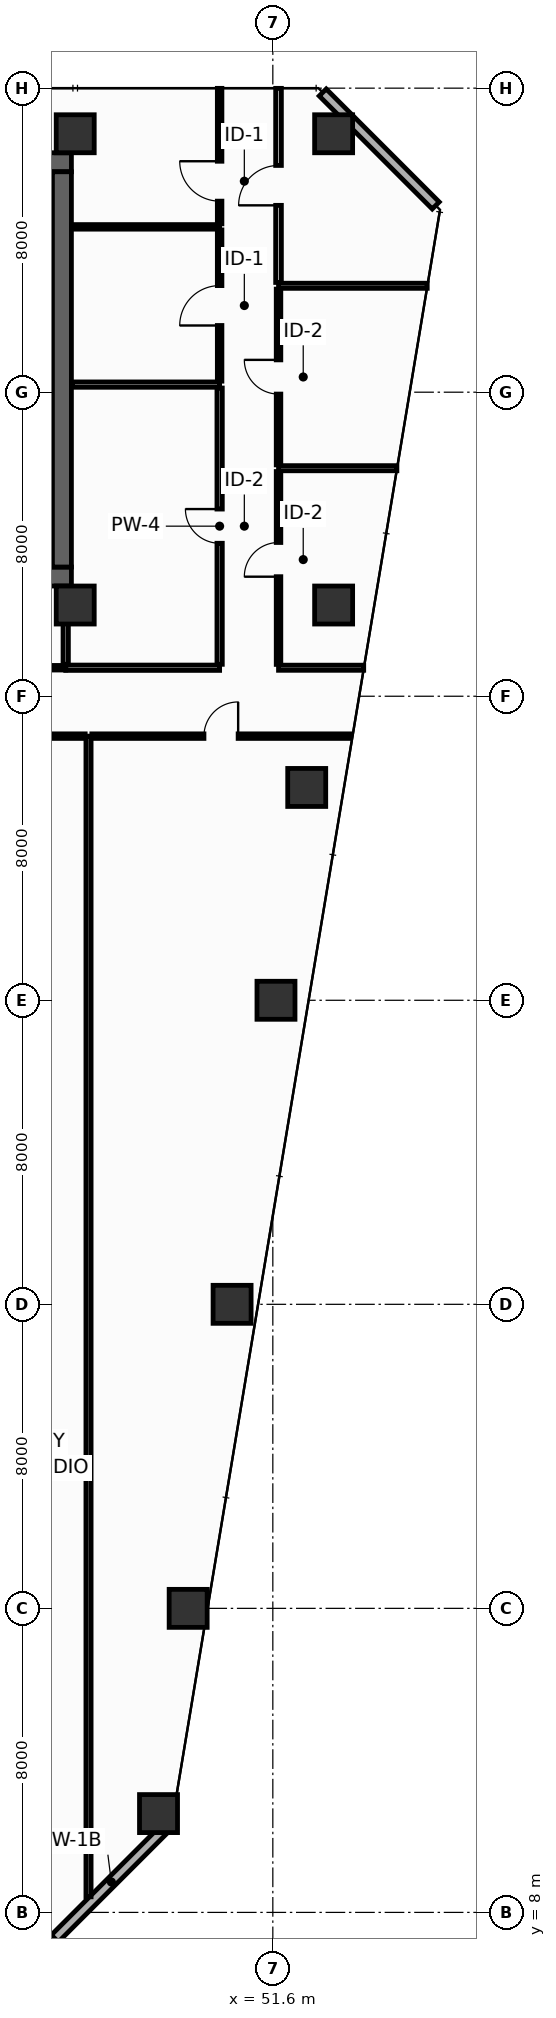
"""IFC4 building model, lengths in metres.
Left out: names, types, materials, properties, quantities, classifications, styles, units other than length and angle.
Written with IfcOpenShell. Run it as: python <this file> out.ifc"""

import sys

from ifc_helpers import new_model, si_unit, direction, frame, frame_2d, origin, origin_2d, place, context, subcontext, project, spatial, rectangle, hollow_rectangle, extrude, element, fill, save


model = new_model("IFC4")
c1 = context("Model", 3, precision=1e-05, world=origin(), true_north=direction((0.0, 1.0)))
c2 = subcontext(c1, "Body", "Model", "MODEL_VIEW")
j1 = project(units=[si_unit("LENGTHUNIT", "METRE"), si_unit("PLANEANGLEUNIT", "RADIAN")], contexts=[c1])
p1 = place(None, origin())
s1 = spatial("IfcSite", under=j1, at=p1, CompositionType="ELEMENT")
p2 = place(p1, origin())
s2 = spatial("IfcBuilding", under=s1, at=p2, CompositionType="ELEMENT")
p3 = place(p2, frame((0.0, 0.0, 129.6)))
s3 = spatial("IfcBuildingStorey", under=s2, at=p3, CompositionType="ELEMENT", Elevation=129.6)
p4 = place(p3, frame((13.6, 43.15, 0.0), z_axis=(0.0, 0.0, 1.0), x_axis=(1.0, 0.0, 0.0)))
e1 = element("IfcWall", 1, at=p4, inside=s3, PredefinedType="SHEAR", context=c2, shape_type="SweptSolid", body=[
    extrude(rectangle(XDim=32.7, YDim=0.5, at=frame_2d((16.35, 0.0))), origin(), (0.0, 0.0, 1.0), 3.55),
])
p5 = place(p4, frame((5.4, 0.0, 0.0)))
e2 = element("IfcOpeningElement", 2, at=p5, cuts=e1, PredefinedType="OPENING", context=c2, shape_type="SweptSolid", body=[
    extrude(rectangle(XDim=1.1, YDim=2.15, at=frame_2d((0.55, 1.075))), frame((0.0, 0.26, 0.0), z_axis=(0.0, -1.0, 0.0), x_axis=(1.0, 0.0, 0.0)), (0.0, 0.0, 1.0), 0.52),
])
p6 = place(p4, frame((25.6, 0.0, 0.0)))
e3 = element("IfcOpeningElement", 3, at=p6, cuts=e1, PredefinedType="OPENING", context=c2, shape_type="SweptSolid", body=[
    extrude(rectangle(XDim=1.1, YDim=2.15, at=frame_2d((0.55, 1.075))), frame((0.0, 0.26, 0.0), z_axis=(0.0, -1.0, 0.0), x_axis=(1.0, 0.0, 0.0)), (0.0, 0.0, 1.0), 0.52),
])
p7 = place(p3, frame((13.6, 54.05, 0.0), z_axis=(0.0, 0.0, 1.0), x_axis=(1.0, 0.0, 0.0)))
e4 = element("IfcWall", 4, at=p7, inside=s3, PredefinedType="SHEAR", context=c2, shape_type="SweptSolid", body=[
    extrude(rectangle(XDim=32.7, YDim=0.5, at=frame_2d((16.35, 0.0))), origin(), (0.0, 0.0, 1.0), 3.55),
])
p8 = place(p3, frame((46.05, 43.4, 0.0), z_axis=(0.0, 0.0, 1.0), x_axis=(0.0, 1.0, 0.0)))
e5 = element("IfcWall", 5, at=p8, inside=s3, PredefinedType="SHEAR", context=c2, shape_type="SweptSolid", body=[
    extrude(rectangle(XDim=10.4, YDim=0.5, at=frame_2d((5.2, 0.0))), origin(), (0.0, 0.0, 1.0), 3.55),
])
for number, where, z_axis, x_axis in (
    (6, (46.4, 54.8, 0.0), (0.0, 0.0, 1.0), (1.0, 0.0, 0.0)),
    (7, (53.2, 54.8, 0.0), (0.0, 0.0, 1.0), (1.0, 0.0, 0.0)),
    (8, (46.4, 42.4, 0.0), (0.0, 0.0, 1.0), (1.0, 0.0, 0.0)),
    (9, (53.2, 42.4, 0.0), (0.0, 0.0, 1.0), (1.0, 0.0, 0.0)),
    (10, (48.592, 10.6, 0.0), (0.0, 0.0, 1.0), (1.0, 0.0, 0.0)),
    (11, (49.372, 16.0, 0.0), (0.0, 0.0, 1.0), (1.0, 0.0, 0.0)),
    (12, (50.528, 24.0, 0.0), (0.0, 0.0, 1.0), (1.0, 0.0, 0.0)),
    (13, (51.683, 32.0, 0.0), (0.0, 0.0, 1.0), (1.0, 0.0, 0.0)),
    (14, (52.492, 37.6, 0.0), (0.0, 0.0, 1.0), (1.0, 0.0, 0.0)),
):
    element("IfcColumn", number, at=place(p3, frame(where, z_axis=z_axis, x_axis=x_axis)), inside=s3, PredefinedType="COLUMN", context=c2, shape_type="SweptSolid", body=[
        extrude(hollow_rectangle(XDim=1.0, YDim=1.0, WallThickness=0.045, at=origin_2d()), origin(), (0.0, 0.0, 1.0), 3.8),
    ])
p9 = place(p3, frame((45.864, 7.313, 0.0), z_axis=(0.0, 0.0, 1.0), x_axis=(0.70707775441, 0.707135806771, 0.0)))
e15 = element("IfcWall", 15, at=p9, inside=s3, PredefinedType="STANDARD", context=c2, shape_type="SweptSolid", body=[
    extrude(rectangle(XDim=4.206, YDim=0.26, at=frame_2d((2.103, 0.0))), origin(), (0.0, 0.0, 1.0), 3.55),
])
p10 = place(p3, frame((55.887, 52.913, 0.0), z_axis=(0.0, 0.0, 1.0), x_axis=(-0.707106781187, 0.707106781187, 0.0)))
e16 = element("IfcWall", 16, at=p10, inside=s3, PredefinedType="STANDARD", context=c2, shape_type="SweptSolid", body=[
    extrude(rectangle(XDim=4.206, YDim=0.26, at=frame_2d((2.103, 0.0))), origin(), (0.0, 0.0, 1.0), 3.55),
])
p11 = place(p3, frame((46.15, 40.75, 0.0), z_axis=(0.0, 0.0, 1.0), x_axis=(1.0, 0.0, 0.0)))
e17 = element("IfcWall", 17, at=p11, inside=s3, PredefinedType="PARTITIONING", context=c2, shape_type="SweptSolid", body=[
    extrude(rectangle(XDim=4.05, YDim=0.14, at=frame_2d((2.025, 0.0))), origin(), (0.0, 0.0, 1.0), 3.55),
])
p12 = place(p3, frame((46.15, 40.84, 0.0), z_axis=(0.0, 0.0, 1.0), x_axis=(0.0, 1.0, 0.0)))
e18 = element("IfcWall", 18, at=p12, inside=s3, PredefinedType="PARTITIONING", context=c2, shape_type="SweptSolid", body=[
    extrude(rectangle(XDim=2.04, YDim=0.14, at=frame_2d((1.02, 0.0))), origin(), (0.0, 0.0, 1.0), 3.55),
])
p13 = place(p3, frame((46.32, 48.2, 0.0), z_axis=(0.0, 0.0, 1.0), x_axis=(1.0, 0.0, 0.0)))
e19 = element("IfcWall", 19, at=p13, inside=s3, PredefinedType="PARTITIONING", context=c2, shape_type="SweptSolid", body=[
    extrude(rectangle(XDim=3.88, YDim=0.14, at=frame_2d((1.94, 0.0))), origin(), (0.0, 0.0, 1.0), 3.55),
])
p14 = place(p3, frame((50.2, 40.84, 0.0), z_axis=(0.0, 0.0, 1.0), x_axis=(0.0, 1.0, 0.0)))
e20 = element("IfcWall", 20, at=p14, inside=s3, PredefinedType="PARTITIONING", context=c2, shape_type="SweptSolid", body=[
    extrude(rectangle(XDim=7.27, YDim=0.14, at=frame_2d((3.635, 0.0))), origin(), (0.0, 0.0, 1.0), 2.835),
])
p15 = place(p14, frame((3.185, 0.0, 0.0)))
e21 = element("IfcOpeningElement", 21, at=p15, cuts=e20, PredefinedType="OPENING", context=c2, shape_type="SweptSolid", body=[
    extrude(rectangle(XDim=0.9, YDim=2.1, at=frame_2d((0.45, 1.05))), frame((0.0, 0.08, 0.0), z_axis=(0.0, -1.0, 0.0), x_axis=(1.0, 0.0, 0.0)), (0.0, 0.0, 1.0), 0.16),
])
p16 = place(p3, frame((46.32, 52.35, 0.0), z_axis=(0.0, 0.0, 1.0), x_axis=(1.0, 0.0, 0.0)))
e22 = element("IfcWall", 22, at=p16, inside=s3, PredefinedType="PARTITIONING", context=c2, shape_type="SweptSolid", body=[
    extrude(rectangle(XDim=3.88, YDim=0.12, at=frame_2d((1.94, 0.0))), origin(), (0.0, 0.0, 1.0), 3.55),
])
p17 = place(p3, frame((50.2, 48.29, 0.0), z_axis=(0.0, 0.0, 1.0), x_axis=(0.0, 1.0, 0.0)))
e23 = element("IfcWall", 23, at=p17, inside=s3, PredefinedType="PARTITIONING", context=c2, shape_type="SweptSolid", body=[
    extrude(rectangle(XDim=3.98, YDim=0.12, at=frame_2d((1.99, 0.0))), origin(), (0.0, 0.0, 1.0), 3.55),
])
p18 = place(p17, frame((1.465, 0.0, 0.0)))
e24 = element("IfcOpeningElement", 24, at=p18, cuts=e23, PredefinedType="OPENING", context=c2, shape_type="SweptSolid", body=[
    extrude(rectangle(XDim=1.05, YDim=2.15, at=frame_2d((0.525, 1.075))), frame((0.0, 0.07, 0.0), z_axis=(0.0, -1.0, 0.0), x_axis=(1.0, 0.0, 0.0)), (0.0, 0.0, 1.0), 0.14),
])
p19 = place(p3, frame((50.2, 52.43, 0.0), z_axis=(0.0, 0.0, 1.0), x_axis=(0.0, 1.0, 0.0)))
e25 = element("IfcWall", 25, at=p19, inside=s3, PredefinedType="PARTITIONING", context=c2, shape_type="SweptSolid", body=[
    extrude(rectangle(XDim=3.565, YDim=0.12, at=frame_2d((1.783, 0.0))), origin(), (0.0, 0.0, 1.0), 2.935),
])
p20 = place(p19, frame((0.597, 0.0, 0.0)))
e26 = element("IfcOpeningElement", 26, at=p20, cuts=e25, PredefinedType="OPENING", context=c2, shape_type="SweptSolid", body=[
    extrude(rectangle(XDim=1.05, YDim=2.15, at=frame_2d((0.525, 1.075))), frame((0.0, 0.07, 0.0), z_axis=(0.0, -1.0, 0.0), x_axis=(1.0, 0.0, 0.0)), (0.0, 0.0, 1.0), 0.14),
])
p21 = place(p3, frame((51.75, 40.75, 0.0), z_axis=(0.0, 0.0, 1.0), x_axis=(1.0, 0.0, 0.0)))
e27 = element("IfcWall", 27, at=p21, inside=s3, PredefinedType="PARTITIONING", context=c2, shape_type="SweptSolid", body=[
    extrude(rectangle(XDim=2.242, YDim=0.135, at=frame_2d((1.121, 0.0))), origin(), (0.0, 0.0, 1.0), 3.035),
])
p22 = place(p3, frame((51.75, 46.0, 0.0), z_axis=(0.0, 0.0, 1.0), x_axis=(1.0, 0.0, 0.0)))
e28 = element("IfcWall", 28, at=p22, inside=s3, PredefinedType="PARTITIONING", context=c2, shape_type="SweptSolid", body=[
    extrude(rectangle(XDim=3.115, YDim=0.135, at=frame_2d((1.557, 0.0))), origin(), (0.0, 0.0, 1.0), 2.835),
])
p23 = place(p3, frame((51.75, 50.8, 0.0), z_axis=(0.0, 0.0, 1.0), x_axis=(1.0, 0.0, 0.0)))
e29 = element("IfcWall", 29, at=p23, inside=s3, PredefinedType="PARTITIONING", context=c2, shape_type="SweptSolid", body=[
    extrude(rectangle(XDim=3.912, YDim=0.135, at=frame_2d((1.956, 0.0))), origin(), (0.0, 0.0, 1.0), 2.835),
])
p24 = place(p3, frame((51.75, 40.837, 0.0), z_axis=(0.0, 0.0, 1.0), x_axis=(0.0, 1.0, 0.0)))
e30 = element("IfcWall", 30, at=p24, inside=s3, PredefinedType="PARTITIONING", context=c2, shape_type="SweptSolid", body=[
    extrude(rectangle(XDim=5.075, YDim=0.12, at=frame_2d((2.538, 0.0))), origin(), (0.0, 0.0, 1.0), 2.835),
])
p25 = place(p24, frame((2.308, 0.0, 0.0)))
e31 = element("IfcOpeningElement", 31, at=p25, cuts=e30, PredefinedType="OPENING", context=c2, shape_type="SweptSolid", body=[
    extrude(rectangle(XDim=0.9, YDim=2.1, at=frame_2d((0.45, 1.05))), frame((0.0, 0.07, 0.0), z_axis=(0.0, -1.0, 0.0), x_axis=(1.0, 0.0, 0.0)), (0.0, 0.0, 1.0), 0.14),
])
p26 = place(p3, frame((51.75, 46.087, 0.0), z_axis=(0.0, 0.0, 1.0), x_axis=(0.0, 1.0, 0.0)))
e32 = element("IfcWall", 32, at=p26, inside=s3, PredefinedType="PARTITIONING", context=c2, shape_type="SweptSolid", body=[
    extrude(rectangle(XDim=4.625, YDim=0.12, at=frame_2d((2.312, 0.0))), origin(), (0.0, 0.0, 1.0), 3.55),
])
p27 = place(p26, frame((1.863, 0.0, 0.0)))
e33 = element("IfcOpeningElement", 33, at=p27, cuts=e32, PredefinedType="OPENING", context=c2, shape_type="SweptSolid", body=[
    extrude(rectangle(XDim=0.9, YDim=2.1, at=frame_2d((0.45, 1.05))), frame((0.0, 0.07, 0.0), z_axis=(0.0, -1.0, 0.0), x_axis=(1.0, 0.0, 0.0)), (0.0, 0.0, 1.0), 0.14),
])
p28 = place(p3, frame((51.75, 50.887, 0.0), z_axis=(0.0, 0.0, 1.0), x_axis=(0.0, 1.0, 0.0)))
e34 = element("IfcWall", 34, at=p28, inside=s3, PredefinedType="PARTITIONING", context=c2, shape_type="SweptSolid", body=[
    extrude(rectangle(XDim=5.108, YDim=0.15, at=frame_2d((2.554, 0.0))), origin(), (0.0, 0.0, 1.0), 2.935),
])
p29 = place(p28, frame((2.029, 0.0, 0.0)))
e35 = element("IfcOpeningElement", 35, at=p29, cuts=e34, PredefinedType="OPENING", context=c2, shape_type="SweptSolid", body=[
    extrude(rectangle(XDim=1.05, YDim=2.15, at=frame_2d((0.525, 1.075))), frame((0.0, 0.085, 0.0), z_axis=(0.0, -1.0, 0.0), x_axis=(1.0, 0.0, 0.0)), (0.0, 0.0, 1.0), 0.17),
])
p30 = place(p3, frame((40.995, 40.75, 0.0), z_axis=(0.0, 0.0, 1.0), x_axis=(1.0, 0.0, 0.0)))
e36 = element("IfcWall", 36, at=p30, inside=s3, PredefinedType="PARTITIONING", context=c2, shape_type="SweptSolid", body=[
    extrude(rectangle(XDim=5.155, YDim=0.12, at=frame_2d((2.577, 0.0))), origin(), (0.0, 0.0, 1.0), 3.55),
])
p31 = place(p30, frame((2.128, 0.0, 0.0)))
e37 = element("IfcOpeningElement", 37, at=p31, cuts=e36, PredefinedType="OPENING", context=c2, shape_type="SweptSolid", body=[
    extrude(rectangle(XDim=0.9, YDim=2.1, at=frame_2d((0.45, 1.05))), frame((0.0, 0.07, 0.0), z_axis=(0.0, -1.0, 0.0), x_axis=(1.0, 0.0, 0.0)), (0.0, 0.0, 1.0), 0.14),
])
p32 = place(p3, frame((46.75, 8.411, 0.0), z_axis=(0.0, 0.0, 1.0), x_axis=(0.0, 1.0, 0.0)))
e38 = element("IfcWall", 38, at=p32, inside=s3, PredefinedType="PARTITIONING", context=c2, shape_type="SweptSolid", body=[
    extrude(rectangle(XDim=30.539, YDim=0.135, at=frame_2d((15.27, 0.0))), origin(), (0.0, 0.0, 1.0), 2.835),
])
p33 = place(p3, frame((41.107, 38.95, 0.0), z_axis=(0.0, 0.0, 1.0), x_axis=(1.0, 0.0, 0.0)))
e39 = element("IfcWall", 39, at=p33, inside=s3, PredefinedType="PARTITIONING", context=c2, shape_type="SweptSolid", body=[
    extrude(rectangle(XDim=5.555, YDim=0.12, at=frame_2d((2.778, 0.0))), origin(), (0.0, 0.0, 1.0), 3.55),
])
p34 = place(p33, frame((2.327, 0.0, 0.0)))
e40 = element("IfcOpeningElement", 40, at=p34, cuts=e39, PredefinedType="OPENING", context=c2, shape_type="SweptSolid", body=[
    extrude(rectangle(XDim=0.9, YDim=2.1, at=frame_2d((0.45, 1.05))), frame((0.0, 0.07, 0.0), z_axis=(0.0, -1.0, 0.0), x_axis=(1.0, 0.0, 0.0)), (0.0, 0.0, 1.0), 0.14),
])
p35 = place(p3, frame((46.837, 38.95, 0.0), z_axis=(0.0, 0.0, 1.0), x_axis=(1.0, 0.0, 0.0)))
e41 = element("IfcWall", 41, at=p35, inside=s3, PredefinedType="PARTITIONING", context=c2, shape_type="SweptSolid", body=[
    extrude(rectangle(XDim=6.8, YDim=0.12, at=frame_2d((3.4, 0.0))), origin(), (0.0, 0.0, 1.0), 3.035),
])
p36 = place(p35, frame((2.95, 0.0, 0.0)))
e42 = element("IfcOpeningElement", 42, at=p36, cuts=e41, PredefinedType="OPENING", context=c2, shape_type="SweptSolid", body=[
    extrude(rectangle(XDim=0.9, YDim=2.1, at=frame_2d((0.45, 1.05))), frame((0.0, 0.07, 0.0), z_axis=(0.0, -1.0, 0.0), x_axis=(1.0, 0.0, 0.0)), (0.0, 0.0, 1.0), 0.14),
])
p37 = place(p15, origin())
e43 = element("IfcDoor", 43, at=p37, inside=s3, OperationType="SINGLE_SWING_RIGHT", PredefinedType="DOOR", context=c2, shape_type="SweptSolid", body=[
    extrude(rectangle(XDim=0.9, YDim=2.1, at=frame_2d((0.45, 1.05))), frame((0.0, 0.025, 0.0), z_axis=(0.0, -1.0, 0.0), x_axis=(1.0, 0.0, 0.0)), (0.0, 0.0, 1.0), 0.05),
])
fill(e21, e43)
p38 = place(p18, origin())
e44 = element("IfcDoor", 44, at=p38, inside=s3, OperationType="SINGLE_SWING_LEFT", PredefinedType="DOOR", context=c2, shape_type="SweptSolid", body=[
    extrude(rectangle(XDim=1.05, YDim=2.15, at=frame_2d((0.525, 1.075))), frame((0.0, 0.025, 0.0), z_axis=(0.0, -1.0, 0.0), x_axis=(1.0, 0.0, 0.0)), (0.0, 0.0, 1.0), 0.05),
])
fill(e24, e44)
p39 = place(p20, origin())
e45 = element("IfcDoor", 45, at=p39, inside=s3, OperationType="SINGLE_SWING_RIGHT", PredefinedType="DOOR", context=c2, shape_type="SweptSolid", body=[
    extrude(rectangle(XDim=1.05, YDim=2.15, at=frame_2d((0.525, 1.075))), frame((0.0, 0.025, 0.0), z_axis=(0.0, -1.0, 0.0), x_axis=(1.0, 0.0, 0.0)), (0.0, 0.0, 1.0), 0.05),
])
fill(e26, e45)
p40 = place(p25, origin())
e46 = element("IfcDoor", 46, at=p40, inside=s3, OperationType="SINGLE_SWING_LEFT", PredefinedType="DOOR", context=c2, shape_type="SweptSolid", body=[
    extrude(rectangle(XDim=0.9, YDim=2.1, at=frame_2d((0.45, 1.05))), frame((0.0, 0.025, 0.0), z_axis=(0.0, -1.0, 0.0), x_axis=(1.0, 0.0, 0.0)), (0.0, 0.0, 1.0), 0.05),
])
fill(e31, e46)
p41 = place(p27, origin())
e47 = element("IfcDoor", 47, at=p41, inside=s3, OperationType="SINGLE_SWING_RIGHT", PredefinedType="DOOR", context=c2, shape_type="SweptSolid", body=[
    extrude(rectangle(XDim=0.9, YDim=2.1, at=frame_2d((0.45, 1.05))), frame((0.0, 0.025, 0.0), z_axis=(0.0, -1.0, 0.0), x_axis=(1.0, 0.0, 0.0)), (0.0, 0.0, 1.0), 0.05),
])
fill(e33, e47)
p42 = place(p29, origin())
e48 = element("IfcDoor", 48, at=p42, inside=s3, OperationType="SINGLE_SWING_LEFT", PredefinedType="DOOR", context=c2, shape_type="SweptSolid", body=[
    extrude(rectangle(XDim=1.05, YDim=2.15, at=frame_2d((0.525, 1.075))), frame((0.0, 0.025, 0.0), z_axis=(0.0, -1.0, 0.0), x_axis=(1.0, 0.0, 0.0)), (0.0, 0.0, 1.0), 0.05),
])
fill(e35, e48)
p43 = place(p36, origin())
e49 = element("IfcDoor", 49, at=p43, inside=s3, OperationType="SINGLE_SWING_RIGHT", PredefinedType="DOOR", context=c2, shape_type="SweptSolid", body=[
    extrude(rectangle(XDim=0.9, YDim=2.1, at=frame_2d((0.45, 1.05))), frame((0.0, 0.025, 0.0), z_axis=(0.0, -1.0, 0.0), x_axis=(1.0, 0.0, 0.0)), (0.0, 0.0, 1.0), 0.05),
])
fill(e42, e49)
save(model, sys.argv[1])
